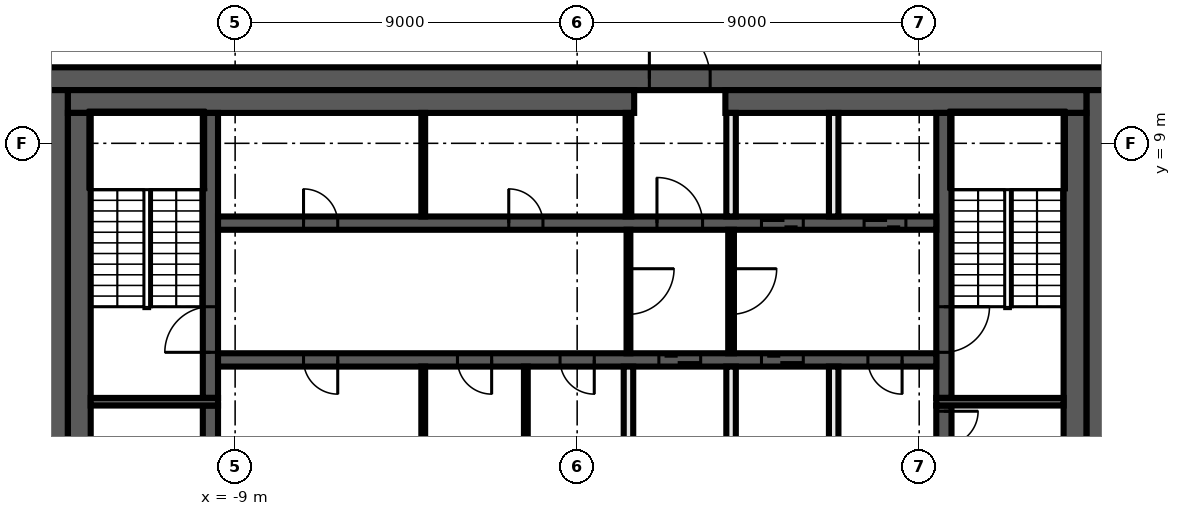
"""IFC4 building model, lengths in metres.
Left out: names, types, materials, properties, quantities, classifications, styles, units other than length and angle.
Written with IfcOpenShell. Run it as: python <this file> out.ifc"""

import sys

from ifc_helpers import new_model, si_unit, direction, frame, frame_2d, origin, place, context, subcontext, project, spatial, rectangle, extrude, element, fill, save


model = new_model("IFC4")
c1 = context("Model", 3, precision=1e-05, world=origin(), true_north=direction((0.0, 1.0)))
c2 = subcontext(c1, "Body", "Model", "MODEL_VIEW")
j1 = project(units=[si_unit("LENGTHUNIT", "METRE"), si_unit("PLANEANGLEUNIT", "RADIAN")], contexts=[c1])
p1 = place(None, origin())
s1 = spatial("IfcSite", under=j1, at=p1, CompositionType="ELEMENT")
p2 = place(p1, origin())
s2 = spatial("IfcBuilding", under=s1, at=p2, CompositionType="ELEMENT")
p3 = place(p2, frame((0.0, 0.0, 371.6)))
s3 = spatial("IfcBuildingStorey", under=s2, at=p3, CompositionType="ELEMENT", Elevation=371.6)
p4 = place(p3, frame((11.367, -20.469, 0.0), z_axis=(0.0, 0.0, 1.0), x_axis=(0.424125024155, 0.905603646131, 0.0)))
e1 = element("IfcWall", 1, at=p4, inside=s3, PredefinedType="SOLIDWALL", context=c2, shape_type="SweptSolid", body=[
    extrude(rectangle(XDim=28.801, YDim=0.25, at=frame_2d((14.401, 0.0))), origin(), (0.0, 0.0, 1.0), 3.8),
])
p5 = place(p3, frame((23.583, 5.614, 0.0), z_axis=(0.0, 0.0, 1.0), x_axis=(-0.671256862452, 0.741224813812, 0.0)))
e2 = element("IfcWall", 2, at=p5, inside=s3, PredefinedType="SOLIDWALL", context=c2, shape_type="SweptSolid", body=[
    extrude(rectangle(XDim=20.856, YDim=0.25, at=frame_2d((10.428, 0.0))), origin(), (0.0, 0.0, 1.0), 3.8),
])
p6 = place(p3, frame((-11.138, 20.28, 0.0), z_axis=(0.0, 0.0, 1.0), x_axis=(-0.441342255748, -0.897338850876, 0.0)))
e3 = element("IfcWall", 3, at=p6, inside=s3, PredefinedType="SOLIDWALL", context=c2, shape_type="SweptSolid", body=[
    extrude(rectangle(XDim=28.805, YDim=0.25, at=frame_2d((14.403, 0.0))), origin(), (0.0, 0.0, 1.0), 3.8),
])
p7 = place(p3, frame((-14.0, 10.7, 0.0), z_axis=(0.0, 0.0, 1.0), x_axis=(1.0, 0.0, 0.0)))
e4 = element("IfcWall", 4, at=p7, inside=s3, PredefinedType="SHEAR", context=c2, shape_type="SweptSolid", body=[
    extrude(rectangle(XDim=28.0, YDim=0.6, at=frame_2d((14.0, 0.0))), origin(), (0.0, 0.0, 1.0), 3.9),
])
p8 = place(p7, frame((15.9, 0.0, 0.0)))
e5 = element("IfcOpeningElement", 5, at=p8, cuts=e4, PredefinedType="OPENING", context=c2, shape_type="SweptSolid", body=[
    extrude(rectangle(XDim=1.6, YDim=2.1, at=frame_2d((0.8, 1.05))), frame((0.0, 0.31, 0.0), z_axis=(0.0, -1.0, 0.0), x_axis=(1.0, 0.0, 0.0)), (0.0, 0.0, 1.0), 0.62),
])
for number, where, z_axis, x_axis in (
    (6, (13.7, 10.4, 0.0), (0.0, 0.0, 1.0), (0.0, -1.0, 0.0)),
    (7, (-13.7, -10.4, 0.0), (0.0, 0.0, 1.0), (0.0, 1.0, 0.0)),
):
    element("IfcWall", number, at=place(p3, frame(where, z_axis=z_axis, x_axis=x_axis)), inside=s3, PredefinedType="SHEAR", context=c2, shape_type="SweptSolid", body=[
        extrude(rectangle(XDim=20.8, YDim=0.6, at=frame_2d((10.4, 0.0))), origin(), (0.0, 0.0, 1.0), 3.9),
    ])
p9 = place(p3, frame((-13.4, 10.1, 0.0), z_axis=(0.0, 0.0, 1.0), x_axis=(1.0, 0.0, 0.0)))
e8 = element("IfcWall", 8, at=p9, inside=s3, PredefinedType="SHEAR", context=c2, shape_type="SweptSolid", body=[
    extrude(rectangle(XDim=14.9, YDim=0.6, at=frame_2d((7.45, 0.0))), origin(), (0.0, 0.0, 1.0), 3.9),
])
p10 = place(p3, frame((3.9, 10.1, 0.0), z_axis=(0.0, 0.0, 1.0), x_axis=(1.0, 0.0, 0.0)))
e9 = element("IfcWall", 9, at=p10, inside=s3, PredefinedType="SHEAR", context=c2, shape_type="SweptSolid", body=[
    extrude(rectangle(XDim=9.5, YDim=0.6, at=frame_2d((4.75, 0.0))), origin(), (0.0, 0.0, 1.0), 3.9),
])
for number, where, z_axis, x_axis in (
    (10, (13.1, 9.8, 0.0), (0.0, 0.0, 1.0), (0.0, -1.0, 0.0)),
    (11, (-13.1, -9.8, 0.0), (0.0, 0.0, 1.0), (0.0, 1.0, 0.0)),
):
    element("IfcWall", number, at=place(p3, frame(where, z_axis=z_axis, x_axis=x_axis)), inside=s3, PredefinedType="SHEAR", context=c2, shape_type="SweptSolid", body=[
        extrude(rectangle(XDim=19.6, YDim=0.6, at=frame_2d((9.8, 0.0))), origin(), (0.0, 0.0, 1.0), 3.9),
    ])
p11 = place(p3, frame((9.65, 2.1, 0.0), z_axis=(0.0, 0.0, 1.0), x_axis=(0.0, -1.0, 0.0)))
e12 = element("IfcWall", 12, at=p11, inside=s3, PredefinedType="SHEAR", context=c2, shape_type="SweptSolid", body=[
    extrude(rectangle(XDim=4.2, YDim=0.4, at=frame_2d((2.1, 0.0))), origin(), (0.0, 0.0, 1.0), 3.9),
])
p12 = place(p11, frame((0.15, 0.0, 0.0)))
e13 = element("IfcOpeningElement", 13, at=p12, cuts=e12, PredefinedType="OPENING", context=c2, shape_type="SweptSolid", body=[
    extrude(rectangle(XDim=0.9, YDim=2.1, at=frame_2d((0.45, 1.05))), frame((0.0, 0.21, 0.0), z_axis=(0.0, -1.0, 0.0), x_axis=(1.0, 0.0, 0.0)), (0.0, 0.0, 1.0), 0.42),
])
p13 = place(p3, frame((9.65, 9.8, 0.0), z_axis=(0.0, 0.0, 1.0), x_axis=(0.0, -1.0, 0.0)))
e14 = element("IfcWall", 14, at=p13, inside=s3, PredefinedType="SHEAR", context=c2, shape_type="SweptSolid", body=[
    extrude(rectangle(XDim=7.5, YDim=0.4, at=frame_2d((3.75, 0.0))), origin(), (0.0, 0.0, 1.0), 3.9),
])
p14 = place(p13, frame((5.1, 0.0, 0.0)))
e15 = element("IfcOpeningElement", 15, at=p14, cuts=e14, PredefinedType="OPENING", context=c2, shape_type="SweptSolid", body=[
    extrude(rectangle(XDim=1.2, YDim=2.1, at=frame_2d((0.6, 1.05))), frame((0.0, 0.21, 0.0), z_axis=(0.0, -1.0, 0.0), x_axis=(1.0, 0.0, 0.0)), (0.0, 0.0, 1.0), 0.42),
])
p15 = place(p3, frame((-9.65, -2.1, 0.0), z_axis=(0.0, 0.0, 1.0), x_axis=(0.0, 1.0, 0.0)))
e16 = element("IfcWall", 16, at=p15, inside=s3, PredefinedType="SHEAR", context=c2, shape_type="SweptSolid", body=[
    extrude(rectangle(XDim=4.2, YDim=0.4, at=frame_2d((2.1, 0.0))), origin(), (0.0, 0.0, 1.0), 3.9),
])
p16 = place(p3, frame((-9.65, 2.3, 0.0), z_axis=(0.0, 0.0, 1.0), x_axis=(0.0, 1.0, 0.0)))
e17 = element("IfcWall", 17, at=p16, inside=s3, PredefinedType="SHEAR", context=c2, shape_type="SweptSolid", body=[
    extrude(rectangle(XDim=7.5, YDim=0.4, at=frame_2d((3.75, 0.0))), origin(), (0.0, 0.0, 1.0), 3.9),
])
p17 = place(p16, frame((1.2, 0.0, 0.0)))
e18 = element("IfcOpeningElement", 18, at=p17, cuts=e17, PredefinedType="OPENING", context=c2, shape_type="SweptSolid", body=[
    extrude(rectangle(XDim=1.2, YDim=2.1, at=frame_2d((0.6, 1.05))), frame((0.0, 0.21, 0.0), z_axis=(0.0, -1.0, 0.0), x_axis=(1.0, 0.0, 0.0)), (0.0, 0.0, 1.0), 0.42),
])
for number, where, z_axis, x_axis in (
    (19, (9.45, 2.2, 0.0), (0.0, 0.0, 1.0), (1.0, 0.0, 0.0)),
    (20, (-9.45, 2.2, 0.0), (0.0, 0.0, 1.0), (-1.0, 0.0, 0.0)),
):
    element("IfcWall", number, at=place(p3, frame(where, z_axis=z_axis, x_axis=x_axis)), inside=s3, PredefinedType="SHEAR", context=c2, shape_type="SweptSolid", body=[
        extrude(rectangle(XDim=3.35, YDim=0.2, at=frame_2d((1.675, 0.0))), origin(), (0.0, 0.0, 1.0), 3.9),
    ])
p18 = place(p3, frame((-9.45, 6.9, 0.0), z_axis=(0.0, 0.0, 1.0), x_axis=(1.0, 0.0, 0.0)))
e21 = element("IfcWall", 21, at=p18, inside=s3, PredefinedType="SHEAR", context=c2, shape_type="SweptSolid", body=[
    extrude(rectangle(XDim=18.9, YDim=0.35, at=frame_2d((9.45, 0.0))), origin(), (0.0, 0.0, 1.0), 3.9),
])
p19 = place(p18, frame((11.55, 0.0, 0.0)))
e22 = element("IfcOpeningElement", 22, at=p19, cuts=e21, PredefinedType="OPENING", context=c2, shape_type="SweptSolid", body=[
    extrude(rectangle(XDim=1.2, YDim=2.1, at=frame_2d((0.6, 1.05))), frame((0.0, 0.185, 0.0), z_axis=(0.0, -1.0, 0.0), x_axis=(1.0, 0.0, 0.0)), (0.0, 0.0, 1.0), 0.37),
])
p20 = place(p18, frame((14.3, 0.0, 0.0)))
e23 = element("IfcOpeningElement", 23, at=p20, cuts=e21, PredefinedType="OPENING", context=c2, shape_type="SweptSolid", body=[
    extrude(rectangle(XDim=1.1, YDim=2.1, at=frame_2d((0.55, 1.05))), frame((0.0, 0.185, 0.0), z_axis=(0.0, -1.0, 0.0), x_axis=(1.0, 0.0, 0.0)), (0.0, 0.0, 1.0), 0.37),
])
p21 = place(p18, frame((17.0, 0.0, 0.0)))
e24 = element("IfcOpeningElement", 24, at=p21, cuts=e21, PredefinedType="OPENING", context=c2, shape_type="SweptSolid", body=[
    extrude(rectangle(XDim=1.1, YDim=2.1, at=frame_2d((0.55, 1.05))), frame((0.0, 0.185, 0.0), z_axis=(0.0, -1.0, 0.0), x_axis=(1.0, 0.0, 0.0)), (0.0, 0.0, 1.0), 0.37),
])
p22 = place(p18, frame((2.25, 0.0, 0.0)))
e25 = element("IfcOpeningElement", 25, at=p22, cuts=e21, PredefinedType="OPENING", context=c2, shape_type="SweptSolid", body=[
    extrude(rectangle(XDim=0.9, YDim=2.1, at=frame_2d((0.45, 1.05))), frame((0.0, 0.185, 0.0), z_axis=(0.0, -1.0, 0.0), x_axis=(1.0, 0.0, 0.0)), (0.0, 0.0, 1.0), 0.37),
])
p23 = place(p18, frame((7.65, 0.0, 0.0)))
e26 = element("IfcOpeningElement", 26, at=p23, cuts=e21, PredefinedType="OPENING", context=c2, shape_type="SweptSolid", body=[
    extrude(rectangle(XDim=0.9, YDim=2.1, at=frame_2d((0.45, 1.05))), frame((0.0, 0.185, 0.0), z_axis=(0.0, -1.0, 0.0), x_axis=(1.0, 0.0, 0.0)), (0.0, 0.0, 1.0), 0.37),
])
p24 = place(p3, frame((9.45, 3.3, 0.0), z_axis=(0.0, 0.0, 1.0), x_axis=(-1.0, 0.0, 0.0)))
e27 = element("IfcWall", 27, at=p24, inside=s3, PredefinedType="SHEAR", context=c2, shape_type="SweptSolid", body=[
    extrude(rectangle(XDim=18.9, YDim=0.35, at=frame_2d((9.45, 0.0))), origin(), (0.0, 0.0, 1.0), 3.9),
])
p25 = place(p24, frame((6.2, 0.0, 0.0)))
e28 = element("IfcOpeningElement", 28, at=p25, cuts=e27, PredefinedType="OPENING", context=c2, shape_type="SweptSolid", body=[
    extrude(rectangle(XDim=1.1, YDim=2.1, at=frame_2d((0.55, 1.05))), frame((0.0, 0.185, 0.0), z_axis=(0.0, -1.0, 0.0), x_axis=(1.0, 0.0, 0.0)), (0.0, 0.0, 1.0), 0.37),
])
p26 = place(p24, frame((3.5, 0.0, 0.0)))
e29 = element("IfcOpeningElement", 29, at=p26, cuts=e27, PredefinedType="OPENING", context=c2, shape_type="SweptSolid", body=[
    extrude(rectangle(XDim=1.1, YDim=2.1, at=frame_2d((0.55, 1.05))), frame((0.0, 0.185, 0.0), z_axis=(0.0, -1.0, 0.0), x_axis=(1.0, 0.0, 0.0)), (0.0, 0.0, 1.0), 0.37),
])
p27 = place(p24, frame((0.9, 0.0, 0.0)))
e30 = element("IfcOpeningElement", 30, at=p27, cuts=e27, PredefinedType="OPENING", context=c2, shape_type="SweptSolid", body=[
    extrude(rectangle(XDim=0.9, YDim=2.1, at=frame_2d((0.45, 1.05))), frame((0.0, 0.185, 0.0), z_axis=(0.0, -1.0, 0.0), x_axis=(1.0, 0.0, 0.0)), (0.0, 0.0, 1.0), 0.37),
])
p28 = place(p24, frame((15.75, 0.0, 0.0)))
e31 = element("IfcOpeningElement", 31, at=p28, cuts=e27, PredefinedType="OPENING", context=c2, shape_type="SweptSolid", body=[
    extrude(rectangle(XDim=0.9, YDim=2.1, at=frame_2d((0.45, 1.05))), frame((0.0, 0.185, 0.0), z_axis=(0.0, -1.0, 0.0), x_axis=(1.0, 0.0, 0.0)), (0.0, 0.0, 1.0), 0.37),
])
p29 = place(p24, frame((11.7, 0.0, 0.0)))
e32 = element("IfcOpeningElement", 32, at=p29, cuts=e27, PredefinedType="OPENING", context=c2, shape_type="SweptSolid", body=[
    extrude(rectangle(XDim=0.9, YDim=2.1, at=frame_2d((0.45, 1.05))), frame((0.0, 0.185, 0.0), z_axis=(0.0, -1.0, 0.0), x_axis=(1.0, 0.0, 0.0)), (0.0, 0.0, 1.0), 0.37),
])
p30 = place(p24, frame((9.0, 0.0, 0.0)))
e33 = element("IfcOpeningElement", 33, at=p30, cuts=e27, PredefinedType="OPENING", context=c2, shape_type="SweptSolid", body=[
    extrude(rectangle(XDim=0.9, YDim=2.1, at=frame_2d((0.45, 1.05))), frame((0.0, 0.185, 0.0), z_axis=(0.0, -1.0, 0.0), x_axis=(1.0, 0.0, 0.0)), (0.0, 0.0, 1.0), 0.37),
])
for number, where, z_axis, x_axis in (
    (34, (6.75, 0.4, 0.0), (0.0, 0.0, 1.0), (0.0, 1.0, 0.0)),
    (35, (6.75, 7.075, 0.0), (0.0, 0.0, 1.0), (0.0, 1.0, 0.0)),
):
    element("IfcWall", number, at=place(p3, frame(where, z_axis=z_axis, x_axis=x_axis)), inside=s3, PredefinedType="SOLIDWALL", context=c2, shape_type="SweptSolid", body=[
        extrude(rectangle(XDim=2.725, YDim=0.25, at=frame_2d((1.363, 0.0))), origin(), (0.0, 0.0, 1.0), 3.9),
    ])
p31 = place(p3, frame((4.05, 6.725, 0.0), z_axis=(0.0, 0.0, 1.0), x_axis=(0.0, -1.0, 0.0)))
e36 = element("IfcWall", 36, at=p31, inside=s3, PredefinedType="PARTITIONING", context=c2, shape_type="SweptSolid", body=[
    extrude(rectangle(XDim=3.25, YDim=0.15, at=frame_2d((1.625, 0.0))), origin(), (0.0, 0.0, 1.0), 3.9),
])
p32 = place(p31, frame((1.025, 0.0, 0.0)))
e37 = element("IfcOpeningElement", 37, at=p32, cuts=e36, PredefinedType="OPENING", context=c2, shape_type="SweptSolid", body=[
    extrude(rectangle(XDim=1.2, YDim=2.1, at=frame_2d((0.6, 1.05))), frame((0.0, 0.085, 0.0), z_axis=(0.0, -1.0, 0.0), x_axis=(1.0, 0.0, 0.0)), (0.0, 0.0, 1.0), 0.17),
])
for number, where, z_axis, x_axis in (
    (38, (4.05, 0.4, 0.0), (0.0, 0.0, 1.0), (0.0, 1.0, 0.0)),
    (39, (4.05, 7.075, 0.0), (0.0, 0.0, 1.0), (0.0, 1.0, 0.0)),
):
    element("IfcWall", number, at=place(p3, frame(where, z_axis=z_axis, x_axis=x_axis)), inside=s3, PredefinedType="SOLIDWALL", context=c2, shape_type="SweptSolid", body=[
        extrude(rectangle(XDim=2.725, YDim=0.25, at=frame_2d((1.363, 0.0))), origin(), (0.0, 0.0, 1.0), 3.9),
    ])
p33 = place(p3, frame((1.35, 7.075, 0.0), z_axis=(0.0, 0.0, 1.0), x_axis=(0.0, 1.0, 0.0)))
e40 = element("IfcWall", 40, at=p33, inside=s3, PredefinedType="PARTITIONING", context=c2, shape_type="SweptSolid", body=[
    extrude(rectangle(XDim=2.725, YDim=0.15, at=frame_2d((1.363, 0.0))), origin(), (0.0, 0.0, 1.0), 3.9),
])
p34 = place(p3, frame((1.35, 6.725, 0.0), z_axis=(0.0, 0.0, 1.0), x_axis=(0.0, -1.0, 0.0)))
e41 = element("IfcWall", 41, at=p34, inside=s3, PredefinedType="PARTITIONING", context=c2, shape_type="SweptSolid", body=[
    extrude(rectangle(XDim=3.25, YDim=0.1, at=frame_2d((1.625, 0.0))), origin(), (0.0, 0.0, 1.0), 3.9),
])
p35 = place(p34, frame((1.025, 0.0, 0.0)))
e42 = element("IfcOpeningElement", 42, at=p35, cuts=e41, PredefinedType="OPENING", context=c2, shape_type="SweptSolid", body=[
    extrude(rectangle(XDim=1.2, YDim=2.1, at=frame_2d((0.6, 1.05))), frame((0.0, 0.06, 0.0), z_axis=(0.0, -1.0, 0.0), x_axis=(1.0, 0.0, 0.0)), (0.0, 0.0, 1.0), 0.12),
])
p36 = place(p3, frame((1.35, 0.4, 0.0), z_axis=(0.0, 0.0, 1.0), x_axis=(0.0, 1.0, 0.0)))
e43 = element("IfcWall", 43, at=p36, inside=s3, PredefinedType="SOLIDWALL", context=c2, shape_type="SweptSolid", body=[
    extrude(rectangle(XDim=2.725, YDim=0.25, at=frame_2d((1.363, 0.0))), origin(), (0.0, 0.0, 1.0), 3.9),
])
for number, where, z_axis, x_axis in (
    (44, (-1.35, 0.4, 0.0), (0.0, 0.0, 1.0), (0.0, 1.0, 0.0)),
    (45, (-4.05, 0.4, 0.0), (0.0, 0.0, 1.0), (0.0, 1.0, 0.0)),
    (46, (-4.05, 7.075, 0.0), (0.0, 0.0, 1.0), (0.0, 1.0, 0.0)),
):
    element("IfcWall", number, at=place(p3, frame(where, z_axis=z_axis, x_axis=x_axis)), inside=s3, PredefinedType="PARTITIONING", context=c2, shape_type="SweptSolid", body=[
        extrude(rectangle(XDim=2.725, YDim=0.1, at=frame_2d((1.363, 0.0))), origin(), (0.0, 0.0, 1.0), 3.9),
    ])
p37 = place(p12, origin())
e47 = element("IfcDoor", 47, at=p37, inside=s3, OperationType="SINGLE_SWING_RIGHT", PredefinedType="DOOR", context=c2, shape_type="SweptSolid", body=[
    extrude(rectangle(XDim=0.9, YDim=2.1, at=frame_2d((0.45, 1.05))), frame((0.0, 0.025, 0.0), z_axis=(0.0, -1.0, 0.0), x_axis=(1.0, 0.0, 0.0)), (0.0, 0.0, 1.0), 0.05),
])
fill(e13, e47)
p38 = place(p8, origin())
e48 = element("IfcDoor", 48, at=p38, inside=s3, OperationType="DOUBLE_DOOR_SINGLE_SWING", PredefinedType="DOOR", context=c2, shape_type="SweptSolid", body=[
    extrude(rectangle(XDim=1.6, YDim=2.1, at=frame_2d((0.8, 1.05))), frame((0.0, 0.025, 0.0), z_axis=(0.0, -1.0, 0.0), x_axis=(1.0, 0.0, 0.0)), (0.0, 0.0, 1.0), 0.05),
])
fill(e5, e48)
p39 = place(p19, origin())
e49 = element("IfcDoor", 49, at=p39, inside=s3, OperationType="SINGLE_SWING_LEFT", PredefinedType="DOOR", context=c2, shape_type="SweptSolid", body=[
    extrude(rectangle(XDim=1.2, YDim=2.1, at=frame_2d((0.6, 1.05))), frame((0.0, 0.025, 0.0), z_axis=(0.0, -1.0, 0.0), x_axis=(1.0, 0.0, 0.0)), (0.0, 0.0, 1.0), 0.05),
])
fill(e22, e49)
p40 = place(p20, origin())
e50 = element("IfcDoor", 50, at=p40, inside=s3, OperationType="DOUBLE_DOOR_SLIDING", PredefinedType="DOOR", context=c2, shape_type="SweptSolid", body=[
    extrude(rectangle(XDim=1.1, YDim=2.1, at=frame_2d((0.55, 1.05))), frame((0.0, 0.025, 0.0), z_axis=(0.0, -1.0, 0.0), x_axis=(1.0, 0.0, 0.0)), (0.0, 0.0, 1.0), 0.05),
])
fill(e23, e50)
p41 = place(p21, origin())
e51 = element("IfcDoor", 51, at=p41, inside=s3, OperationType="DOUBLE_DOOR_SLIDING", PredefinedType="DOOR", context=c2, shape_type="SweptSolid", body=[
    extrude(rectangle(XDim=1.1, YDim=2.1, at=frame_2d((0.55, 1.05))), frame((0.0, 0.025, 0.0), z_axis=(0.0, -1.0, 0.0), x_axis=(1.0, 0.0, 0.0)), (0.0, 0.0, 1.0), 0.05),
])
fill(e24, e51)
p42 = place(p25, origin())
e52 = element("IfcDoor", 52, at=p42, inside=s3, OperationType="DOUBLE_DOOR_SLIDING", PredefinedType="DOOR", context=c2, shape_type="SweptSolid", body=[
    extrude(rectangle(XDim=1.1, YDim=2.1, at=frame_2d((0.55, 1.05))), frame((0.0, 0.025, 0.0), z_axis=(0.0, -1.0, 0.0), x_axis=(1.0, 0.0, 0.0)), (0.0, 0.0, 1.0), 0.05),
])
fill(e28, e52)
p43 = place(p26, origin())
e53 = element("IfcDoor", 53, at=p43, inside=s3, OperationType="DOUBLE_DOOR_SLIDING", PredefinedType="DOOR", context=c2, shape_type="SweptSolid", body=[
    extrude(rectangle(XDim=1.1, YDim=2.1, at=frame_2d((0.55, 1.05))), frame((0.0, 0.025, 0.0), z_axis=(0.0, -1.0, 0.0), x_axis=(1.0, 0.0, 0.0)), (0.0, 0.0, 1.0), 0.05),
])
fill(e29, e53)
p44 = place(p27, origin())
e54 = element("IfcDoor", 54, at=p44, inside=s3, OperationType="SINGLE_SWING_LEFT", PredefinedType="DOOR", context=c2, shape_type="SweptSolid", body=[
    extrude(rectangle(XDim=0.9, YDim=2.1, at=frame_2d((0.45, 1.05))), frame((0.0, 0.025, 0.0), z_axis=(0.0, -1.0, 0.0), x_axis=(1.0, 0.0, 0.0)), (0.0, 0.0, 1.0), 0.05),
])
fill(e30, e54)
p45 = place(p22, origin())
e55 = element("IfcDoor", 55, at=p45, inside=s3, OperationType="SINGLE_SWING_RIGHT", PredefinedType="DOOR", context=c2, shape_type="SweptSolid", body=[
    extrude(rectangle(XDim=0.9, YDim=2.1, at=frame_2d((0.45, 1.05))), frame((0.0, 0.025, 0.0), z_axis=(0.0, -1.0, 0.0), x_axis=(1.0, 0.0, 0.0)), (0.0, 0.0, 1.0), 0.05),
])
fill(e25, e55)
p46 = place(p23, origin())
e56 = element("IfcDoor", 56, at=p46, inside=s3, OperationType="SINGLE_SWING_LEFT", PredefinedType="DOOR", context=c2, shape_type="SweptSolid", body=[
    extrude(rectangle(XDim=0.9, YDim=2.1, at=frame_2d((0.45, 1.05))), frame((0.0, 0.025, 0.0), z_axis=(0.0, -1.0, 0.0), x_axis=(1.0, 0.0, 0.0)), (0.0, 0.0, 1.0), 0.05),
])
fill(e26, e56)
p47 = place(p28, origin())
e57 = element("IfcDoor", 57, at=p47, inside=s3, OperationType="SINGLE_SWING_RIGHT", PredefinedType="DOOR", context=c2, shape_type="SweptSolid", body=[
    extrude(rectangle(XDim=0.9, YDim=2.1, at=frame_2d((0.45, 1.05))), frame((0.0, 0.025, 0.0), z_axis=(0.0, -1.0, 0.0), x_axis=(1.0, 0.0, 0.0)), (0.0, 0.0, 1.0), 0.05),
])
fill(e31, e57)
p48 = place(p29, origin())
e58 = element("IfcDoor", 58, at=p48, inside=s3, OperationType="SINGLE_SWING_LEFT", PredefinedType="DOOR", context=c2, shape_type="SweptSolid", body=[
    extrude(rectangle(XDim=0.9, YDim=2.1, at=frame_2d((0.45, 1.05))), frame((0.0, 0.025, 0.0), z_axis=(0.0, -1.0, 0.0), x_axis=(1.0, 0.0, 0.0)), (0.0, 0.0, 1.0), 0.05),
])
fill(e32, e58)
p49 = place(p30, origin())
e59 = element("IfcDoor", 59, at=p49, inside=s3, OperationType="SINGLE_SWING_RIGHT", PredefinedType="DOOR", context=c2, shape_type="SweptSolid", body=[
    extrude(rectangle(XDim=0.9, YDim=2.1, at=frame_2d((0.45, 1.05))), frame((0.0, 0.025, 0.0), z_axis=(0.0, -1.0, 0.0), x_axis=(1.0, 0.0, 0.0)), (0.0, 0.0, 1.0), 0.05),
])
fill(e33, e59)
p50 = place(p14, origin())
e60 = element("IfcDoor", 60, at=p50, inside=s3, OperationType="SINGLE_SWING_LEFT", PredefinedType="DOOR", context=c2, shape_type="SweptSolid", body=[
    extrude(rectangle(XDim=1.2, YDim=2.1, at=frame_2d((0.6, 1.05))), frame((0.0, 0.025, 0.0), z_axis=(0.0, -1.0, 0.0), x_axis=(1.0, 0.0, 0.0)), (0.0, 0.0, 1.0), 0.05),
])
fill(e15, e60)
p51 = place(p17, origin())
e61 = element("IfcDoor", 61, at=p51, inside=s3, OperationType="SINGLE_SWING_RIGHT", PredefinedType="DOOR", context=c2, shape_type="SweptSolid", body=[
    extrude(rectangle(XDim=1.2, YDim=2.1, at=frame_2d((0.6, 1.05))), frame((0.0, 0.025, 0.0), z_axis=(0.0, -1.0, 0.0), x_axis=(1.0, 0.0, 0.0)), (0.0, 0.0, 1.0), 0.05),
])
fill(e18, e61)
p52 = place(p35, origin())
e62 = element("IfcDoor", 62, at=p52, inside=s3, OperationType="SINGLE_SWING_LEFT", PredefinedType="DOOR", context=c2, shape_type="SweptSolid", body=[
    extrude(rectangle(XDim=1.2, YDim=2.1, at=frame_2d((0.6, 1.05))), frame((0.0, 0.025, 0.0), z_axis=(0.0, -1.0, 0.0), x_axis=(1.0, 0.0, 0.0)), (0.0, 0.0, 1.0), 0.05),
])
fill(e42, e62)
p53 = place(p32, origin())
e63 = element("IfcDoor", 63, at=p53, inside=s3, OperationType="SINGLE_SWING_RIGHT", PredefinedType="DOOR", context=c2, shape_type="SweptSolid", body=[
    extrude(rectangle(XDim=1.2, YDim=2.1, at=frame_2d((0.6, 1.05))), frame((0.0, 0.025, 0.0), z_axis=(0.0, -1.0, 0.0), x_axis=(1.0, 0.0, 0.0)), (0.0, 0.0, 1.0), 0.05),
])
fill(e37, e63)
save(model, sys.argv[1])
